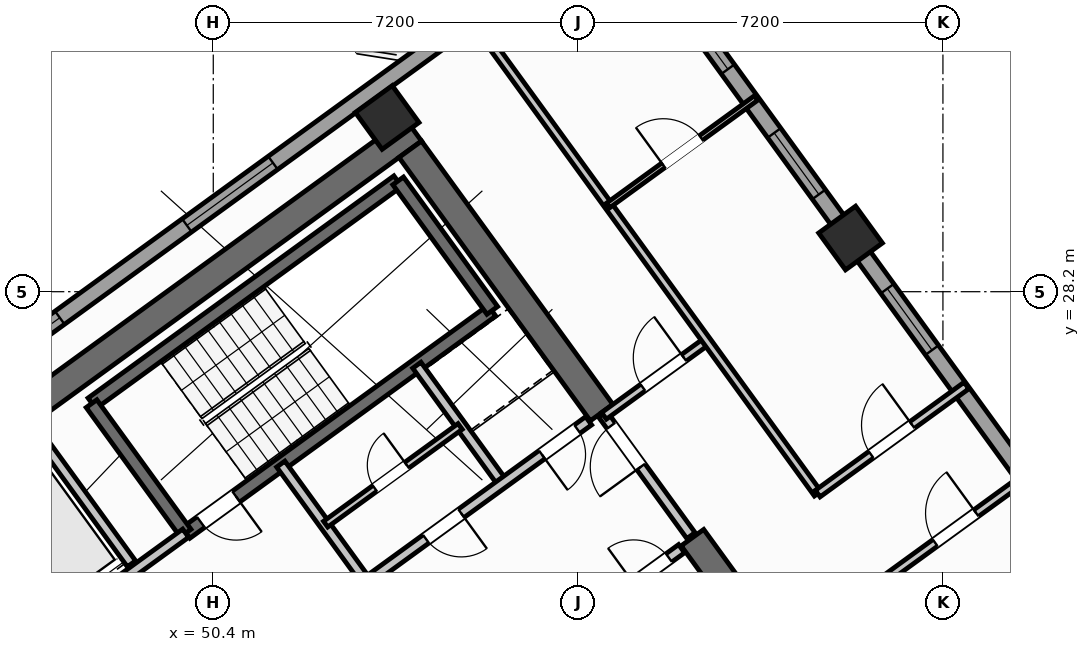
"""IFC4 building model, lengths in metres.
Left out: names, types, materials, properties, quantities, classifications, styles, units other than length and angle.
Written with IfcOpenShell. Run it as: python <this file> out.ifc"""

import sys

from ifc_helpers import new_model, si_unit, direction, frame, frame_2d, origin, origin_2d, place, context, subcontext, project, spatial, rectangle, hollow_rectangle, extrude, source, transform, mapped, element, fill, save


model = new_model("IFC4")
c1 = context("Model", 3, precision=1e-05, world=origin(), true_north=direction((0.0, 1.0)))
c2 = subcontext(c1, "Body", "Model", "MODEL_VIEW")
j1 = project(units=[si_unit("LENGTHUNIT", "METRE"), si_unit("PLANEANGLEUNIT", "RADIAN")], contexts=[c1])
p1 = place(None, origin())
s1 = spatial("IfcSite", under=j1, at=p1, CompositionType="ELEMENT")
p2 = place(p1, origin())
s2 = spatial("IfcBuilding", under=s1, at=p2, CompositionType="ELEMENT")
p3 = place(p2, frame((0.0, 0.0, 162.3)))
s3 = spatial("IfcBuildingStorey", under=s2, at=p3, CompositionType="ELEMENT", Elevation=162.3)
p4 = place(p3, frame((44.365, 24.142, 0.0), z_axis=(0.0, 0.0, 1.0), x_axis=(0.809024304885, 0.587775190107, 0.0)))
e1 = element("IfcWall", 1, at=p4, inside=s3, PredefinedType="SHEAR", context=c2, shape_type="SweptSolid", body=[
    extrude(rectangle(XDim=12.34, YDim=0.55, at=frame_2d((6.17, 0.0))), origin(), (0.0, 0.0, 1.0), 3.35),
])
p5 = place(p3, frame((48.526, 18.884, 0.0), z_axis=(0.0, 0.0, 1.0), x_axis=(-0.587764933797, 0.809031756236, 0.0)))
e2 = element("IfcWall", 2, at=p5, inside=s3, PredefinedType="SHEAR", context=c2, shape_type="SweptSolid", body=[
    extrude(rectangle(XDim=6.425, YDim=0.55, at=frame_2d((3.212, 0.0))), origin(), (0.0, 0.0, 1.0), 3.35),
])
p6 = place(p3, frame((61.958, 20.454, 0.0), z_axis=(0.0, 0.0, 1.0), x_axis=(-0.587802113096, 0.809004744015, 0.0)))
e3 = element("IfcWall", 3, at=p6, inside=s3, PredefinedType="SHEAR", context=c2, shape_type="SweptSolid", body=[
    extrude(rectangle(XDim=3.575, YDim=0.55, at=frame_2d((1.788, 0.0))), origin(), (0.0, 0.0, 1.0), 3.35),
])
p7 = place(p3, frame((58.064, 25.813, 0.0), z_axis=(0.0, 0.0, 1.0), x_axis=(-0.587764933797, 0.809031756236, 0.0)))
e4 = element("IfcWall", 4, at=p7, inside=s3, PredefinedType="SHEAR", context=c2, shape_type="SweptSolid", body=[
    extrude(rectangle(XDim=6.425, YDim=0.55, at=frame_2d((3.212, 0.0))), origin(), (0.0, 0.0, 1.0), 3.35),
])
m1 = source(origin(), c2, "Body", "SweptSolid", [
    extrude(hollow_rectangle(XDim=0.9, YDim=0.9, WallThickness=0.036, at=origin_2d()), origin(), (0.0, 0.0, 1.0), 3.6),
])
for number, where, z_axis, x_axis in (
    (5, (53.832, 31.638, 0.0), (0.0, 0.0, 1.0), (0.809, 0.588, 0.0)),
    (6, (62.977, 29.259, 0.0), (0.0, 0.0, 1.0), (0.809, 0.588, 0.0)),
):
    element("IfcColumn", number, at=place(p3, frame(where, z_axis=z_axis, x_axis=x_axis)), inside=s3, PredefinedType="COLUMN", context=c2, shape_type="MappedRepresentation", body=[
        mapped(m1, transform((0.0, 0.0, 0.0), scale=1.0)),
    ])
p8 = place(p3, frame((43.938, 25.192, 0.0), z_axis=(0.0, 0.0, 1.0), x_axis=(0.809016324578, 0.587786174187, 0.0)))
e7 = element("IfcWall", 7, at=p8, inside=s3, PredefinedType="STANDARD", context=c2, shape_type="SweptSolid", body=[
    extrude(rectangle(XDim=17.587, YDim=0.32, at=frame_2d((8.794, 0.0))), origin(), (0.0, 0.0, 1.0), 3.35),
])
p9 = place(p8, frame((14.914, 0.0, 0.0)))
e8 = element("IfcOpeningElement", 8, at=p9, cuts=e7, PredefinedType="OPENING", context=c2, shape_type="SweptSolid", body=[
    extrude(rectangle(XDim=1.05, YDim=2.15, at=frame_2d((0.525, 1.075))), frame((0.0, 0.17, 0.0), z_axis=(0.0, -1.0, 0.0), x_axis=(1.0, 0.0, 0.0)), (0.0, 0.0, 1.0), 0.34),
])
p10 = place(p8, frame((2.144, 0.0, 0.8)))
e9 = element("IfcOpeningElement", 9, at=p10, cuts=e7, PredefinedType="OPENING", context=c2, shape_type="SweptSolid", body=[
    extrude(rectangle(XDim=2.1, YDim=1.55, at=frame_2d((1.05, 0.775))), frame((0.0, 0.17, 0.0), z_axis=(0.0, -1.0, 0.0), x_axis=(1.0, 0.0, 0.0)), (0.0, 0.0, 1.0), 0.34),
])
p11 = place(p8, frame((7.344, 0.0, 0.8)))
e10 = element("IfcOpeningElement", 10, at=p11, cuts=e7, PredefinedType="OPENING", context=c2, shape_type="SweptSolid", body=[
    extrude(rectangle(XDim=2.1, YDim=1.55, at=frame_2d((1.05, 0.775))), frame((0.0, 0.17, 0.0), z_axis=(0.0, -1.0, 0.0), x_axis=(1.0, 0.0, 0.0)), (0.0, 0.0, 1.0), 0.34),
])
p12 = place(p3, frame((58.455, 35.484, 0.0), z_axis=(0.0, 0.0, 1.0), x_axis=(0.587783625747, -0.809018176127, 0.0)))
e11 = element("IfcWall", 11, at=p12, inside=s3, PredefinedType="STANDARD", context=c2, shape_type="SweptSolid", body=[
    extrude(rectangle(XDim=21.587, YDim=0.32, at=frame_2d((10.794, 0.0))), origin(), (0.0, 0.0, 1.0), 2.775),
])
p13 = place(p12, frame((1.475, 0.0, 0.8)))
e12 = element("IfcOpeningElement", 12, at=p13, cuts=e11, PredefinedType="OPENING", context=c2, shape_type="SweptSolid", body=[
    extrude(rectangle(XDim=2.1, YDim=1.55, at=frame_2d((1.05, 0.775))), frame((0.0, 0.17, 0.0), z_axis=(0.0, -1.0, 0.0), x_axis=(1.0, 0.0, 0.0)), (0.0, 0.0, 1.0), 0.34),
])
p14 = place(p12, frame((5.13, 0.0, 0.85)))
e13 = element("IfcOpeningElement", 13, at=p14, cuts=e11, PredefinedType="OPENING", context=c2, shape_type="SweptSolid", body=[
    extrude(rectangle(XDim=1.5, YDim=1.5, at=frame_2d((0.75, 0.75))), frame((0.0, 0.17, 0.0), z_axis=(0.0, -1.0, 0.0), x_axis=(1.0, 0.0, 0.0)), (0.0, 0.0, 1.0), 0.34),
])
p15 = place(p12, frame((8.929, 0.0, 0.85)))
e14 = element("IfcOpeningElement", 14, at=p15, cuts=e11, PredefinedType="OPENING", context=c2, shape_type="SweptSolid", body=[
    extrude(rectangle(XDim=1.5, YDim=1.5, at=frame_2d((0.75, 0.75))), frame((0.0, 0.17, 0.0), z_axis=(0.0, -1.0, 0.0), x_axis=(1.0, 0.0, 0.0)), (0.0, 0.0, 1.0), 0.34),
])
p16 = place(p12, frame((17.581, 0.0, 0.95)))
e15 = element("IfcOpeningElement", 15, at=p16, cuts=e11, PredefinedType="OPENING", context=c2, shape_type="SweptSolid", body=[
    extrude(rectangle(XDim=1.2, YDim=1.4, at=frame_2d((0.6, 0.7))), frame((0.0, 0.17, 0.0), z_axis=(0.0, -1.0, 0.0), x_axis=(1.0, 0.0, 0.0)), (0.0, 0.0, 1.0), 0.34),
])
p17 = place(p3, frame((48.006, 25.996, 0.0), z_axis=(0.0, 0.0, 1.0), x_axis=(0.80901903764, 0.587782439969, 0.0)))
e16 = element("IfcWall", 16, at=p17, inside=s3, PredefinedType="SHEAR", context=c2, shape_type="SweptSolid", body=[
    extrude(rectangle(XDim=7.46, YDim=0.26, at=frame_2d((3.73, 0.0))), origin(), (0.0, 0.0, 1.0), 3.35),
])
p18 = place(p3, frame((49.863, 23.44, 0.0), z_axis=(0.0, 0.0, 1.0), x_axis=(0.809003474932, 0.587803859759, 0.0)))
e17 = element("IfcWall", 17, at=p18, inside=s3, PredefinedType="SHEAR", context=c2, shape_type="SweptSolid", body=[
    extrude(rectangle(XDim=7.46, YDim=0.26, at=frame_2d((3.73, 0.0))), origin(), (0.0, 0.0, 1.0), 3.35),
])
p19 = place(p18, frame((0.36, 0.0, 0.0)))
e18 = element("IfcOpeningElement", 18, at=p19, cuts=e17, PredefinedType="OPENING", context=c2, shape_type="SweptSolid", body=[
    extrude(rectangle(XDim=0.86, YDim=2.05, at=frame_2d((0.43, 1.025))), frame((0.0, 0.14, 0.0), z_axis=(0.0, -1.0, 0.0), x_axis=(1.0, 0.0, 0.0)), (0.0, 0.0, 1.0), 0.28),
])
p20 = place(p3, frame((49.855, 23.434, 0.0), z_axis=(0.0, 0.0, 1.0), x_axis=(-0.58776738483, 0.809029975545, 0.0)))
e19 = element("IfcWall", 19, at=p20, inside=s3, PredefinedType="SHEAR", context=c2, shape_type="SweptSolid", body=[
    extrude(rectangle(XDim=3.16, YDim=0.26, at=frame_2d((1.58, 0.0))), origin(), (0.0, 0.0, 1.0), 3.35),
])
p21 = place(p3, frame((55.906, 27.831, 0.0), z_axis=(0.0, 0.0, 1.0), x_axis=(-0.587804123638, 0.809003283204, 0.0)))
e20 = element("IfcWall", 20, at=p21, inside=s3, PredefinedType="SHEAR", context=c2, shape_type="SweptSolid", body=[
    extrude(rectangle(XDim=3.16, YDim=0.26, at=frame_2d((1.58, 0.0))), origin(), (0.0, 0.0, 1.0), 3.35),
])
p22 = place(p3, frame((47.065, 21.407, 0.0), z_axis=(0.0, 0.0, 1.0), x_axis=(0.809032984992, 0.587763242466, 0.0)))
e21 = element("IfcWall", 21, at=p22, inside=s3, PredefinedType="STANDARD", context=c2, shape_type="SweptSolid", body=[
    extrude(rectangle(XDim=3.448, YDim=0.2, at=frame_2d((1.724, 0.0))), origin(), (0.0, 0.0, 1.0), 3.34),
])
p23 = place(p22, frame((0.458, 0.0, 0.0)))
e22 = element("IfcOpeningElement", 22, at=p23, cuts=e21, PredefinedType="OPENING", context=c2, shape_type="SweptSolid", body=[
    extrude(rectangle(XDim=1.3, YDim=2.2, at=frame_2d((0.65, 1.1))), frame((0.0, 0.11, 0.0), z_axis=(0.0, -1.0, 0.0), x_axis=(1.0, 0.0, 0.0)), (0.0, 0.0, 1.0), 0.22),
])
p24 = place(p3, frame((56.553, 20.884, 0.0), z_axis=(0.0, 0.0, 1.0), x_axis=(0.809023564264, 0.58777620951, 0.0)))
e23 = element("IfcWall", 23, at=p24, inside=s3, PredefinedType="STANDARD", context=c2, shape_type="SweptSolid", body=[
    extrude(rectangle(XDim=3.818, YDim=0.2, at=frame_2d((1.909, 0.0))), origin(), (0.0, 0.0, 1.0), 3.34),
])
p25 = place(p24, frame((0.57, 0.0, 0.0)))
e24 = element("IfcOpeningElement", 24, at=p25, cuts=e23, PredefinedType="OPENING", context=c2, shape_type="SweptSolid", body=[
    extrude(rectangle(XDim=1.1, YDim=2.15, at=frame_2d((0.55, 1.075))), frame((0.0, 0.11, 0.0), z_axis=(0.0, -1.0, 0.0), x_axis=(1.0, 0.0, 0.0)), (0.0, 0.0, 1.0), 0.22),
])
p26 = place(p24, frame((2.65, 0.0, 0.0)))
e25 = element("IfcOpeningElement", 25, at=p26, cuts=e23, PredefinedType="OPENING", context=c2, shape_type="SweptSolid", body=[
    extrude(rectangle(XDim=0.86, YDim=2.05, at=frame_2d((0.43, 1.025))), frame((0.0, 0.11, 0.0), z_axis=(0.0, -1.0, 0.0), x_axis=(1.0, 0.0, 0.0)), (0.0, 0.0, 1.0), 0.22),
])
p27 = place(p3, frame((48.786, 22.83, 0.0), z_axis=(0.0, 0.0, 1.0), x_axis=(-0.587783856777, 0.809018008275, 0.0)))
e26 = element("IfcWall", 26, at=p27, inside=s3, PredefinedType="STANDARD", context=c2, shape_type="SweptSolid", body=[
    extrude(rectangle(XDim=2.92, YDim=0.2, at=frame_2d((1.46, 0.0))), origin(), (0.0, 0.0, 1.0), 3.34),
])
p28 = place(p3, frame((53.425, 22.468, 0.0), z_axis=(0.0, 0.0, 1.0), x_axis=(-0.5877230039, 0.809062216821, 0.0)))
e27 = element("IfcWall", 27, at=p28, inside=s3, PredefinedType="STANDARD", context=c2, shape_type="SweptSolid", body=[
    extrude(rectangle(XDim=2.88, YDim=0.2, at=frame_2d((1.44, 0.0))), origin(), (0.0, 0.0, 1.0), 3.34),
])
p29 = place(p3, frame((56.111, 24.419, 0.0), z_axis=(0.0, 0.0, 1.0), x_axis=(-0.58777848983, 0.809021907548, 0.0)))
e28 = element("IfcWall", 28, at=p29, inside=s3, PredefinedType="STANDARD", context=c2, shape_type="SweptSolid", body=[
    extrude(rectangle(XDim=2.88, YDim=0.2, at=frame_2d((1.44, 0.0))), origin(), (0.0, 0.0, 1.0), 3.34),
])
p30 = place(p3, frame((53.425, 22.468, 0.0), z_axis=(0.0, 0.0, 1.0), x_axis=(0.809024377198, 0.587775090574, 0.0)))
e29 = element("IfcWall", 29, at=p30, inside=s3, PredefinedType="STANDARD", context=c2, shape_type="SweptSolid", body=[
    extrude(rectangle(XDim=5.418, YDim=0.2, at=frame_2d((2.709, 0.0))), origin(), (0.0, 0.0, 1.0), 3.34),
])
p31 = place(p30, frame((4.28, 0.0, 0.0)))
e30 = element("IfcOpeningElement", 30, at=p31, cuts=e29, PredefinedType="OPENING", context=c2, shape_type="SweptSolid", body=[
    extrude(rectangle(XDim=0.86, YDim=2.05, at=frame_2d((0.43, 1.025))), frame((0.0, 0.11, 0.0), z_axis=(0.0, -1.0, 0.0), x_axis=(1.0, 0.0, 0.0)), (0.0, 0.0, 1.0), 0.22),
])
p32 = place(p30, frame((1.45, 0.0, 0.0)))
e31 = element("IfcOpeningElement", 31, at=p32, cuts=e29, PredefinedType="OPENING", context=c2, shape_type="SweptSolid", body=[
    extrude(rectangle(XDim=0.86, YDim=2.05, at=frame_2d((0.43, 1.025))), frame((0.0, 0.11, 0.0), z_axis=(0.0, -1.0, 0.0), x_axis=(1.0, 0.0, 0.0)), (0.0, 0.0, 1.0), 0.22),
])
p33 = place(p3, frame((52.618, 23.612, 0.0), z_axis=(0.0, 0.0, 1.0), x_axis=(0.809009587469, 0.587795446889, 0.0)))
e32 = element("IfcWall", 32, at=p33, inside=s3, PredefinedType="PLUMBINGWALL", context=c2, shape_type="SweptSolid", body=[
    extrude(rectangle(XDim=3.28, YDim=0.14, at=frame_2d((1.64, 0.0))), origin(), (0.0, 0.0, 1.0), 3.34),
])
p34 = place(p33, frame((1.2, 0.0, 0.0)))
e33 = element("IfcOpeningElement", 33, at=p34, cuts=e32, PredefinedType="OPENING", context=c2, shape_type="SweptSolid", body=[
    extrude(rectangle(XDim=0.78, YDim=2.05, at=frame_2d((0.39, 1.025))), frame((0.0, 0.08, 0.0), z_axis=(0.0, -1.0, 0.0), x_axis=(1.0, 0.0, 0.0)), (0.0, 0.0, 1.0), 0.16),
])
p35 = place(p3, frame((59.827, 23.386, 0.0), z_axis=(0.0, 0.0, 1.0), x_axis=(-0.587803840107, 0.809003489211, 0.0)))
e34 = element("IfcWall", 34, at=p35, inside=s3, PredefinedType="STANDARD", context=c2, shape_type="SweptSolid", body=[
    extrude(rectangle(XDim=2.96, YDim=0.2, at=frame_2d((1.48, 0.0))), origin(), (0.0, 0.0, 1.0), 3.34),
])
p36 = place(p35, frame((1.68, 0.0, 0.0)))
e35 = element("IfcOpeningElement", 35, at=p36, cuts=e34, PredefinedType="OPENING", context=c2, shape_type="SweptSolid", body=[
    extrude(rectangle(XDim=1.0, YDim=2.1, at=frame_2d((0.5, 1.05))), frame((0.0, 0.11, 0.0), z_axis=(0.0, -1.0, 0.0), x_axis=(1.0, 0.0, 0.0)), (0.0, 0.0, 1.0), 0.22),
])
p37 = place(p3, frame((58.111, 25.749, 0.0), z_axis=(0.0, 0.0, 1.0), x_axis=(0.809000999347, 0.58780726693, 0.0)))
e36 = element("IfcWall", 36, at=p37, inside=s3, PredefinedType="PARTITIONING", context=c2, shape_type="SweptSolid", body=[
    extrude(rectangle(XDim=2.51, YDim=0.16, at=frame_2d((1.255, 0.0))), origin(), (0.0, 0.0, 1.0), 2.775),
])
p38 = place(p37, frame((0.95, 0.0, 0.0)))
e37 = element("IfcOpeningElement", 37, at=p38, cuts=e36, PredefinedType="OPENING", context=c2, shape_type="SweptSolid", body=[
    extrude(rectangle(XDim=1.0, YDim=2.1, at=frame_2d((0.5, 1.05))), frame((0.0, 0.09, 0.0), z_axis=(0.0, -1.0, 0.0), x_axis=(1.0, 0.0, 0.0)), (0.0, 0.0, 1.0), 0.18),
])
p39 = place(p3, frame((62.328, 24.215, 0.0), z_axis=(0.0, 0.0, 1.0), x_axis=(-0.587778600963, 0.809021826807, 0.0)))
e38 = element("IfcWall", 38, at=p39, inside=s3, PredefinedType="PARTITIONING", context=c2, shape_type="SweptSolid", body=[
    extrude(rectangle(XDim=11.45, YDim=0.16, at=frame_2d((5.725, 0.0))), origin(), (0.0, 0.0, 1.0), 3.34),
])
p40 = place(p3, frame((63.592, 22.475, 0.0), z_axis=(0.0, 0.0, 1.0), x_axis=(0.809035546126, 0.58775971715, 0.0)))
e39 = element("IfcWall", 39, at=p40, inside=s3, PredefinedType="PARTITIONING", context=c2, shape_type="SweptSolid", body=[
    extrude(rectangle(XDim=3.63, YDim=0.16, at=frame_2d((1.815, 0.0))), origin(), (0.0, 0.0, 1.0), 3.34),
])
p41 = place(p40, frame((1.305, 0.0, 0.0)))
e40 = element("IfcOpeningElement", 40, at=p41, cuts=e39, PredefinedType="OPENING", context=c2, shape_type="SweptSolid", body=[
    extrude(rectangle(XDim=1.0, YDim=2.1, at=frame_2d((0.5, 1.05))), frame((0.0, 0.09, 0.0), z_axis=(0.0, -1.0, 0.0), x_axis=(1.0, 0.0, 0.0)), (0.0, 0.0, 1.0), 0.18),
])
p42 = place(p3, frame((62.328, 24.215, 0.0), z_axis=(0.0, 0.0, 1.0), x_axis=(0.809003564202, 0.587803736896, 0.0)))
e41 = element("IfcWall", 41, at=p42, inside=s3, PredefinedType="PARTITIONING", context=c2, shape_type="SweptSolid", body=[
    extrude(rectangle(XDim=3.63, YDim=0.16, at=frame_2d((1.815, 0.0))), origin(), (0.0, 0.0, 1.0), 3.34),
])
p43 = place(p42, frame((1.305, 0.0, 0.0)))
e42 = element("IfcOpeningElement", 42, at=p43, cuts=e41, PredefinedType="OPENING", context=c2, shape_type="SweptSolid", body=[
    extrude(rectangle(XDim=1.0, YDim=2.1, at=frame_2d((0.5, 1.05))), frame((0.0, 0.09, 0.0), z_axis=(0.0, -1.0, 0.0), x_axis=(1.0, 0.0, 0.0)), (0.0, 0.0, 1.0), 0.18),
])
p44 = place(p3, frame((58.195, 29.904, 0.0), z_axis=(0.0, 0.0, 1.0), x_axis=(0.809005039917, 0.58780170584, 0.0)))
e43 = element("IfcWall", 43, at=p44, inside=s3, PredefinedType="PARTITIONING", context=c2, shape_type="SweptSolid", body=[
    extrude(rectangle(XDim=3.61, YDim=0.11, at=frame_2d((1.805, 0.0))), origin(), (0.0, 0.0, 1.0), 3.34),
])
p45 = place(p44, frame((1.345, 0.0, 0.0)))
e44 = element("IfcOpeningElement", 44, at=p45, cuts=e43, PredefinedType="OPENING", context=c2, shape_type="SweptSolid", body=[
    extrude(rectangle(XDim=0.92, YDim=2.08, at=frame_2d((0.46, 1.04))), frame((0.0, 0.065, 0.0), z_axis=(0.0, -1.0, 0.0), x_axis=(1.0, 0.0, 0.0)), (0.0, 0.0, 1.0), 0.13),
])
m2 = source(origin(), c2, "Body", "SweptSolid", [
    extrude(rectangle(XDim=2.1, YDim=1.55, at=frame_2d((1.05, 0.775))), frame((0.0, 0.03, 0.0), z_axis=(0.0, -1.0, 0.0), x_axis=(1.0, 0.0, 0.0)), (0.0, 0.0, 1.0), 0.06),
])
p46 = place(p10, origin())
e45 = element("IfcWindow", 45, at=p46, inside=s3, PartitioningType="SINGLE_PANEL", PredefinedType="WINDOW", context=c2, shape_type="MappedRepresentation", body=[
    mapped(m2, transform((0.0, 0.0, 0.0), scale=1.0)),
])
fill(e9, e45)
p47 = place(p11, origin())
e46 = element("IfcWindow", 46, at=p47, inside=s3, PartitioningType="SINGLE_PANEL", PredefinedType="WINDOW", context=c2, shape_type="MappedRepresentation", body=[
    mapped(m2, transform((0.0, 0.0, 0.0), scale=1.0)),
])
fill(e10, e46)
p48 = place(p13, origin())
e47 = element("IfcWindow", 47, at=p48, inside=s3, PartitioningType="SINGLE_PANEL", PredefinedType="WINDOW", context=c2, shape_type="MappedRepresentation", body=[
    mapped(m2, transform((0.0, 0.0, 0.0), scale=1.0)),
])
fill(e12, e47)
m3 = source(origin(), c2, "Body", "SweptSolid", [
    extrude(rectangle(XDim=1.5, YDim=1.5, at=frame_2d((0.75, 0.75))), frame((0.0, 0.03, 0.0), z_axis=(0.0, -1.0, 0.0), x_axis=(1.0, 0.0, 0.0)), (0.0, 0.0, 1.0), 0.06),
])
p49 = place(p14, origin())
e48 = element("IfcWindow", 48, at=p49, inside=s3, PartitioningType="SINGLE_PANEL", PredefinedType="WINDOW", context=c2, shape_type="MappedRepresentation", body=[
    mapped(m3, transform((0.0, 0.0, 0.0), scale=1.0)),
])
fill(e13, e48)
p50 = place(p15, origin())
e49 = element("IfcWindow", 49, at=p50, inside=s3, PartitioningType="SINGLE_PANEL", PredefinedType="WINDOW", context=c2, shape_type="MappedRepresentation", body=[
    mapped(m3, transform((0.0, 0.0, 0.0), scale=1.0)),
])
fill(e14, e49)
m4 = source(origin(), c2, "Body", "SweptSolid", [
    extrude(rectangle(XDim=0.86, YDim=2.05, at=frame_2d((0.43, 1.025))), frame((0.0, 0.025, 0.0), z_axis=(0.0, -1.0, 0.0), x_axis=(1.0, 0.0, 0.0)), (0.0, 0.0, 1.0), 0.05),
])
p51 = place(p19, frame((0.86, 0.0, 0.0), z_axis=(0.0, 0.0, 1.0), x_axis=(-1.0, 0.0, 0.0)))
e50 = element("IfcDoor", 50, at=p51, inside=s3, OperationType="SINGLE_SWING_LEFT", PredefinedType="DOOR", context=c2, shape_type="MappedRepresentation", body=[
    mapped(m4, transform((0.0, 0.0, 0.0), scale=1.0)),
])
fill(e18, e50)
p52 = place(p26, origin())
e51 = element("IfcDoor", 51, at=p52, inside=s3, OperationType="SINGLE_SWING_LEFT", PredefinedType="DOOR", context=c2, shape_type="MappedRepresentation", body=[
    mapped(m4, transform((0.0, 0.0, 0.0), scale=1.0)),
])
fill(e25, e51)
p53 = place(p31, frame((0.86, 0.0, 0.0), z_axis=(0.0, 0.0, 1.0), x_axis=(-1.0, 0.0, 0.0)))
e52 = element("IfcDoor", 52, at=p53, inside=s3, OperationType="SINGLE_SWING_RIGHT", PredefinedType="DOOR", context=c2, shape_type="MappedRepresentation", body=[
    mapped(m4, transform((0.0, 0.0, 0.0), scale=1.0)),
])
fill(e30, e52)
p54 = place(p32, frame((0.86, 0.0, 0.0), z_axis=(0.0, 0.0, 1.0), x_axis=(-1.0, 0.0, 0.0)))
e53 = element("IfcDoor", 53, at=p54, inside=s3, OperationType="SINGLE_SWING_LEFT", PredefinedType="DOOR", context=c2, shape_type="MappedRepresentation", body=[
    mapped(m4, transform((0.0, 0.0, 0.0), scale=1.0)),
])
fill(e31, e53)
m5 = source(origin(), c2, "Body", "SweptSolid", [
    extrude(rectangle(XDim=0.78, YDim=2.05, at=frame_2d((0.39, 1.025))), frame((0.0, 0.025, 0.0), z_axis=(0.0, -1.0, 0.0), x_axis=(1.0, 0.0, 0.0)), (0.0, 0.0, 1.0), 0.05),
])
p55 = place(p34, origin())
e54 = element("IfcDoor", 54, at=p55, inside=s3, OperationType="SINGLE_SWING_RIGHT", PredefinedType="DOOR", context=c2, shape_type="MappedRepresentation", body=[
    mapped(m5, transform((0.0, 0.0, 0.0), scale=1.0)),
])
fill(e33, e54)
m6 = source(origin(), c2, "Body", "SweptSolid", [
    extrude(rectangle(XDim=1.0, YDim=2.1, at=frame_2d((0.5, 1.05))), frame((0.0, 0.025, 0.0), z_axis=(0.0, -1.0, 0.0), x_axis=(1.0, 0.0, 0.0)), (0.0, 0.0, 1.0), 0.05),
])
p56 = place(p38, origin())
e55 = element("IfcDoor", 55, at=p56, inside=s3, OperationType="SINGLE_SWING_RIGHT", PredefinedType="DOOR", context=c2, shape_type="MappedRepresentation", body=[
    mapped(m6, transform((0.0, 0.0, 0.0), scale=1.0)),
])
fill(e37, e55)
p57 = place(p36, origin())
e56 = element("IfcDoor", 56, at=p57, inside=s3, OperationType="SINGLE_SWING_LEFT", PredefinedType="DOOR", context=c2, shape_type="MappedRepresentation", body=[
    mapped(m6, transform((0.0, 0.0, 0.0), scale=1.0)),
])
fill(e35, e56)
p58 = place(p43, origin())
e57 = element("IfcDoor", 57, at=p58, inside=s3, OperationType="SINGLE_SWING_RIGHT", PredefinedType="DOOR", context=c2, shape_type="MappedRepresentation", body=[
    mapped(m6, transform((0.0, 0.0, 0.0), scale=1.0)),
])
fill(e42, e57)
m7 = source(origin(), c2, "Body", "SweptSolid", [
    extrude(rectangle(XDim=0.92, YDim=2.08, at=frame_2d((0.46, 1.04))), frame((0.0, 0.025, 0.0), z_axis=(0.0, -1.0, 0.0), x_axis=(1.0, 0.0, 0.0)), (0.0, 0.0, 1.0), 0.05),
])
p59 = place(p45, origin())
e58 = element("IfcDoor", 58, at=p59, inside=s3, OperationType="SINGLE_SWING_LEFT", PredefinedType="DOOR", context=c2, shape_type="MappedRepresentation", body=[
    mapped(m7, transform((0.0, 0.0, 0.0), scale=1.0)),
])
fill(e44, e58)
p60 = place(p41, origin())
e59 = element("IfcDoor", 59, at=p60, inside=s3, OperationType="SINGLE_SWING_RIGHT", PredefinedType="DOOR", context=c2, shape_type="MappedRepresentation", body=[
    mapped(m6, transform((0.0, 0.0, 0.0), scale=1.0)),
])
fill(e40, e59)
save(model, sys.argv[1])
